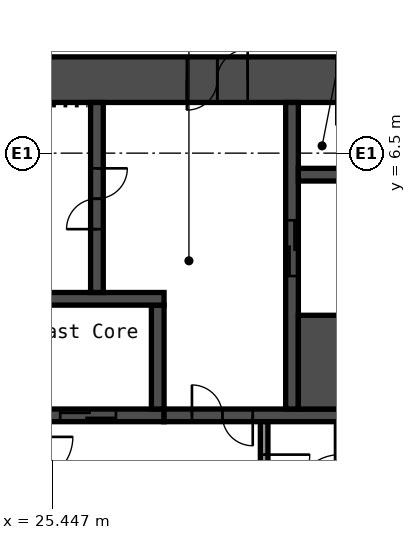
"""IFC4 building model, lengths in metres.
Left out: names, types, materials, properties, quantities, classifications, styles, units other than length and angle.
Written with IfcOpenShell. Run it as: python <this file> out.ifc"""

import sys

from ifc_helpers import new_model, si_unit, direction, frame, frame_2d, origin, place, context, subcontext, project, spatial, rectangle, extrude, element, fill, save


model = new_model("IFC4")
c1 = context("Model", 3, precision=1e-05, world=origin(), true_north=direction((0.0, 1.0)))
c2 = subcontext(c1, "Body", "Model", "MODEL_VIEW")
j1 = project(units=[si_unit("LENGTHUNIT", "METRE"), si_unit("PLANEANGLEUNIT", "RADIAN")], contexts=[c1])
p1 = place(None, origin())
s1 = spatial("IfcSite", under=j1, at=p1, CompositionType="ELEMENT")
p2 = place(p1, origin())
s2 = spatial("IfcBuilding", under=s1, at=p2, CompositionType="ELEMENT")
p3 = place(p2, frame((0.0, 0.0, 29.4)))
s3 = spatial("IfcBuildingStorey", under=s2, at=p3, CompositionType="ELEMENT", Elevation=29.4)
p4 = place(p3, frame((17.7, 7.95, 0.0), z_axis=(0.0, 0.0, 1.0), x_axis=(1.0, 0.0, 0.0)))
e1 = element("IfcWall", 1, at=p4, inside=s3, PredefinedType="SHEAR", context=c2, shape_type="SweptSolid", body=[
    extrude(rectangle(XDim=15.0, YDim=0.9, at=frame_2d((7.5, 0.0))), origin(), (0.0, 0.0, 1.0), 2.8),
])
p5 = place(p4, frame((10.4, 0.0, 0.0)))
e2 = element("IfcOpeningElement", 2, at=p5, cuts=e1, PredefinedType="OPENING", context=c2, shape_type="SweptSolid", body=[
    extrude(rectangle(XDim=1.2, YDim=2.1, at=frame_2d((0.6, 1.05))), frame((0.0, 0.46, 0.0), z_axis=(0.0, -1.0, 0.0), x_axis=(1.0, 0.0, 0.0)), (0.0, 0.0, 1.0), 0.92),
])
p6 = place(p4, frame((13.35, 0.0, 0.0)))
e3 = element("IfcOpeningElement", 3, at=p6, cuts=e1, PredefinedType="OPENING", context=c2, shape_type="SweptSolid", body=[
    extrude(rectangle(XDim=0.9, YDim=2.1, at=frame_2d((0.45, 1.05))), frame((0.0, 0.46, 0.0), z_axis=(0.0, -1.0, 0.0), x_axis=(1.0, 0.0, 0.0)), (0.0, 0.0, 1.0), 0.92),
])
p7 = place(p3, frame((20.15, 1.325, 0.0), z_axis=(0.0, 0.0, 1.0), x_axis=(1.0, 0.0, 0.0)))
e4 = element("IfcWall", 4, at=p7, inside=s3, PredefinedType="SHEAR", context=c2, shape_type="SweptSolid", body=[
    extrude(rectangle(XDim=7.5, YDim=0.25, at=frame_2d((3.75, 0.0))), origin(), (0.0, 0.0, 1.0), 2.8),
])
p8 = place(p7, frame((0.65, 0.0, 0.0)))
e5 = element("IfcOpeningElement", 5, at=p8, cuts=e4, PredefinedType="OPENING", context=c2, shape_type="SweptSolid", body=[
    extrude(rectangle(XDim=1.1, YDim=2.1, at=frame_2d((0.55, 1.05))), frame((0.0, 0.135, 0.0), z_axis=(0.0, -1.0, 0.0), x_axis=(1.0, 0.0, 0.0)), (0.0, 0.0, 1.0), 0.27),
])
p9 = place(p7, frame((3.05, 0.0, 0.0)))
e6 = element("IfcOpeningElement", 6, at=p9, cuts=e4, PredefinedType="OPENING", context=c2, shape_type="SweptSolid", body=[
    extrude(rectangle(XDim=1.1, YDim=2.1, at=frame_2d((0.55, 1.05))), frame((0.0, 0.135, 0.0), z_axis=(0.0, -1.0, 0.0), x_axis=(1.0, 0.0, 0.0)), (0.0, 0.0, 1.0), 0.27),
])
p10 = place(p7, frame((5.45, 0.0, 0.0)))
e7 = element("IfcOpeningElement", 7, at=p10, cuts=e4, PredefinedType="OPENING", context=c2, shape_type="SweptSolid", body=[
    extrude(rectangle(XDim=1.1, YDim=2.1, at=frame_2d((0.55, 1.05))), frame((0.0, 0.135, 0.0), z_axis=(0.0, -1.0, 0.0), x_axis=(1.0, 0.0, 0.0)), (0.0, 0.0, 1.0), 0.27),
])
p11 = place(p3, frame((27.525, 1.45, 0.0), z_axis=(0.0, 0.0, 1.0), x_axis=(0.0, 1.0, 0.0)))
e8 = element("IfcWall", 8, at=p11, inside=s3, PredefinedType="SHEAR", context=c2, shape_type="SweptSolid", body=[
    extrude(rectangle(XDim=2.05, YDim=0.25, at=frame_2d((1.025, 0.0))), origin(), (0.0, 0.0, 1.0), 2.8),
])
p12 = place(p3, frame((20.15, 3.625, 0.0), z_axis=(0.0, 0.0, 1.0), x_axis=(1.0, 0.0, 0.0)))
e9 = element("IfcWall", 9, at=p12, inside=s3, PredefinedType="SHEAR", context=c2, shape_type="SweptSolid", body=[
    extrude(rectangle(XDim=7.5, YDim=0.25, at=frame_2d((3.75, 0.0))), origin(), (0.0, 0.0, 1.0), 2.8),
])
p13 = place(p3, frame((26.325, 3.75, 0.0), z_axis=(0.0, 0.0, 1.0), x_axis=(0.0, 1.0, 0.0)))
e10 = element("IfcWall", 10, at=p13, inside=s3, PredefinedType="SHEAR", context=c2, shape_type="SweptSolid", body=[
    extrude(rectangle(XDim=3.75, YDim=0.25, at=frame_2d((1.875, 0.0))), origin(), (0.0, 0.0, 1.0), 2.8),
])
p14 = place(p13, frame((1.25, 0.0, 0.0)))
e11 = element("IfcOpeningElement", 11, at=p14, cuts=e10, PredefinedType="OPENING", context=c2, shape_type="SweptSolid", body=[
    extrude(rectangle(XDim=1.2, YDim=2.1, at=frame_2d((0.6, 1.05))), frame((0.0, 0.135, 0.0), z_axis=(0.0, -1.0, 0.0), x_axis=(1.0, 0.0, 0.0)), (0.0, 0.0, 1.0), 0.27),
])
p15 = place(p3, frame((27.65, 1.325, 0.0), z_axis=(0.0, 0.0, 1.0), x_axis=(1.0, 0.0, 0.0)))
e12 = element("IfcWall", 12, at=p15, inside=s3, PredefinedType="SHEAR", context=c2, shape_type="SweptSolid", body=[
    extrude(rectangle(XDim=5.05, YDim=0.25, at=frame_2d((2.525, 0.0))), origin(), (0.0, 0.0, 1.0), 2.8),
])
p16 = place(p15, frame((0.55, 0.0, 0.0)))
e13 = element("IfcOpeningElement", 13, at=p16, cuts=e12, PredefinedType="OPENING", context=c2, shape_type="SweptSolid", body=[
    extrude(rectangle(XDim=1.2, YDim=2.1, at=frame_2d((0.6, 1.05))), frame((0.0, 0.135, 0.0), z_axis=(0.0, -1.0, 0.0), x_axis=(1.0, 0.0, 0.0)), (0.0, 0.0, 1.0), 0.27),
])
p17 = place(p3, frame((30.175, 1.45, 0.0), z_axis=(0.0, 0.0, 1.0), x_axis=(0.0, 1.0, 0.0)))
e14 = element("IfcWall", 14, at=p17, inside=s3, PredefinedType="SHEAR", context=c2, shape_type="SweptSolid", body=[
    extrude(rectangle(XDim=6.05, YDim=0.25, at=frame_2d((3.025, 0.0))), origin(), (0.0, 0.0, 1.0), 2.8),
])
p18 = place(p17, frame((2.625, 0.0, 0.0)))
e15 = element("IfcOpeningElement", 15, at=p18, cuts=e14, PredefinedType="OPENING", context=c2, shape_type="SweptSolid", body=[
    extrude(rectangle(XDim=1.1, YDim=2.1, at=frame_2d((0.55, 1.05))), frame((0.0, 0.135, 0.0), z_axis=(0.0, -1.0, 0.0), x_axis=(1.0, 0.0, 0.0)), (0.0, 0.0, 1.0), 0.27),
])
p19 = place(p3, frame((30.3, 2.375, 0.0), z_axis=(0.0, 0.0, 1.0), x_axis=(1.0, 0.0, 0.0)))
e16 = element("IfcWall", 16, at=p19, inside=s3, PredefinedType="SHEAR", context=c2, shape_type="SweptSolid", body=[
    extrude(rectangle(XDim=2.4, YDim=1.85, at=frame_2d((1.2, 0.0))), origin(), (0.0, 0.0, 1.0), 2.8),
])
p20 = place(p3, frame((30.3, 6.075, 0.0), z_axis=(0.0, 0.0, 1.0), x_axis=(1.0, 0.0, 0.0)))
e17 = element("IfcWall", 17, at=p20, inside=s3, PredefinedType="SHEAR", context=c2, shape_type="SweptSolid", body=[
    extrude(rectangle(XDim=2.4, YDim=0.25, at=frame_2d((1.2, 0.0))), origin(), (0.0, 0.0, 1.0), 2.8),
])
p21 = place(p3, frame((29.625, -1.15, 0.0), z_axis=(0.0, 0.0, 1.0), x_axis=(0.0, 1.0, 0.0)))
e18 = element("IfcWall", 18, at=p21, inside=s3, PredefinedType="PARTITIONING", context=c2, shape_type="SweptSolid", body=[
    extrude(rectangle(XDim=2.35, YDim=0.15, at=frame_2d((1.175, 0.0))), origin(), (0.0, 0.0, 1.0), 2.8),
])
p22 = place(p21, frame((0.8, 0.0, 0.0)))
e19 = element("IfcOpeningElement", 19, at=p22, cuts=e18, PredefinedType="OPENING", context=c2, shape_type="SweptSolid", body=[
    extrude(rectangle(XDim=0.9, YDim=2.1, at=frame_2d((0.45, 1.05))), frame((0.0, 0.085, 0.0), z_axis=(0.0, -1.0, 0.0), x_axis=(1.0, 0.0, 0.0)), (0.0, 0.0, 1.0), 0.17),
])
p23 = place(p5, origin())
e20 = element("IfcDoor", 20, at=p23, inside=s3, OperationType="DOUBLE_DOOR_SINGLE_SWING", PredefinedType="DOOR", context=c2, shape_type="SweptSolid", body=[
    extrude(rectangle(XDim=1.2, YDim=2.1, at=frame_2d((0.6, 1.05))), frame((0.0, 0.025, 0.0), z_axis=(0.0, -1.0, 0.0), x_axis=(1.0, 0.0, 0.0)), (0.0, 0.0, 1.0), 0.05),
])
fill(e2, e20)
p24 = place(p14, origin())
e21 = element("IfcDoor", 21, at=p24, inside=s3, OperationType="DOUBLE_DOOR_SINGLE_SWING", PredefinedType="DOOR", context=c2, shape_type="SweptSolid", body=[
    extrude(rectangle(XDim=1.2, YDim=2.1, at=frame_2d((0.6, 1.05))), frame((0.0, 0.025, 0.0), z_axis=(0.0, -1.0, 0.0), x_axis=(1.0, 0.0, 0.0)), (0.0, 0.0, 1.0), 0.05),
])
fill(e11, e21)
p25 = place(p16, origin())
e22 = element("IfcDoor", 22, at=p25, inside=s3, OperationType="DOUBLE_DOOR_SINGLE_SWING", PredefinedType="DOOR", context=c2, shape_type="SweptSolid", body=[
    extrude(rectangle(XDim=1.2, YDim=2.1, at=frame_2d((0.6, 1.05))), frame((0.0, 0.025, 0.0), z_axis=(0.0, -1.0, 0.0), x_axis=(1.0, 0.0, 0.0)), (0.0, 0.0, 1.0), 0.05),
])
fill(e13, e22)
p26 = place(p22, origin())
e23 = element("IfcDoor", 23, at=p26, inside=s3, OperationType="SINGLE_SWING_RIGHT", PredefinedType="DOOR", context=c2, shape_type="SweptSolid", body=[
    extrude(rectangle(XDim=0.9, YDim=2.1, at=frame_2d((0.45, 1.05))), frame((0.0, 0.025, 0.0), z_axis=(0.0, -1.0, 0.0), x_axis=(1.0, 0.0, 0.0)), (0.0, 0.0, 1.0), 0.05),
])
fill(e19, e23)
p27 = place(p10, origin())
e24 = element("IfcDoor", 24, at=p27, inside=s3, OperationType="DOUBLE_DOOR_SLIDING", PredefinedType="DOOR", context=c2, shape_type="SweptSolid", body=[
    extrude(rectangle(XDim=1.1, YDim=2.1, at=frame_2d((0.55, 1.05))), frame((0.0, 0.025, 0.0), z_axis=(0.0, -1.0, 0.0), x_axis=(1.0, 0.0, 0.0)), (0.0, 0.0, 1.0), 0.05),
])
fill(e7, e24)
p28 = place(p18, origin())
e25 = element("IfcDoor", 25, at=p28, inside=s3, OperationType="DOUBLE_DOOR_SLIDING", PredefinedType="DOOR", context=c2, shape_type="SweptSolid", body=[
    extrude(rectangle(XDim=1.1, YDim=2.1, at=frame_2d((0.55, 1.05))), frame((0.0, 0.025, 0.0), z_axis=(0.0, -1.0, 0.0), x_axis=(1.0, 0.0, 0.0)), (0.0, 0.0, 1.0), 0.05),
])
fill(e15, e25)
save(model, sys.argv[1])
